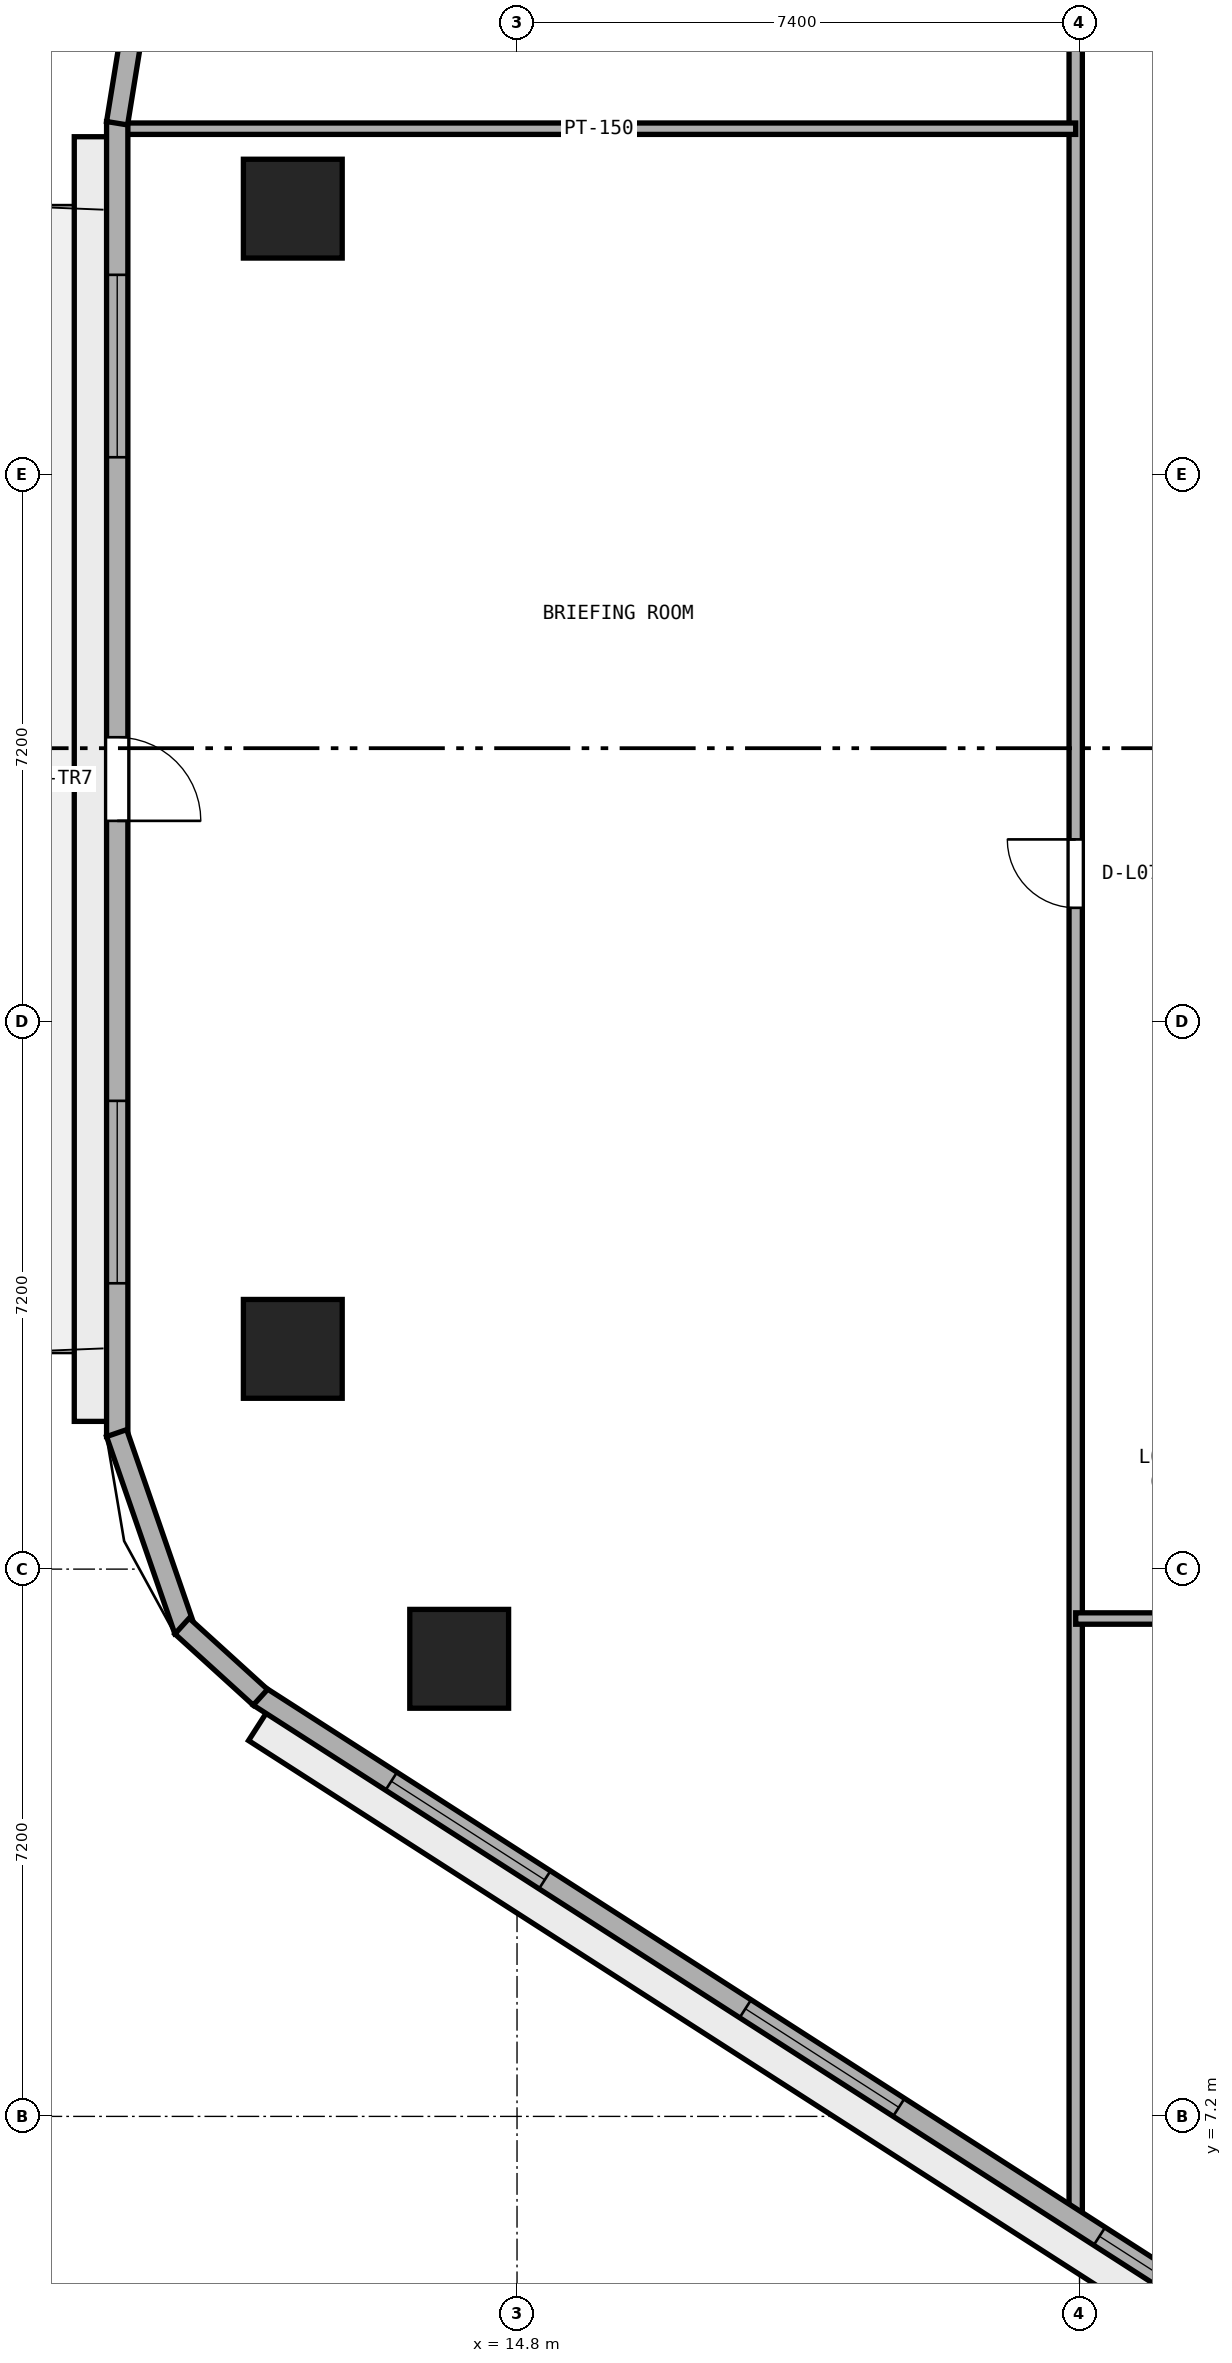
"""IFC4 building model, lengths in metres.
Left out: names, types, materials, properties, quantities, classifications, styles, units other than length and angle.
Written with IfcOpenShell. Run it as: python <this file> out.ifc"""

import sys

from ifc_helpers import new_model, si_unit, direction, frame, frame_2d, origin, origin_2d, place, context, subcontext, project, spatial, rectangle, extrude, element, fill, save


model = new_model("IFC4")
c1 = context("Model", 3, precision=1e-05, world=origin(), true_north=direction((0.0, 1.0)))
c2 = subcontext(c1, "Body", "Model", "MODEL_VIEW")
j1 = project(units=[si_unit("LENGTHUNIT", "METRE"), si_unit("PLANEANGLEUNIT", "RADIAN")], contexts=[c1])
p1 = place(None, origin())
s1 = spatial("IfcSite", under=j1, at=p1, CompositionType="ELEMENT")
p2 = place(p1, origin())
s2 = spatial("IfcBuilding", under=s1, at=p2, CompositionType="ELEMENT")
p3 = place(p2, frame((0.0, 0.0, 32.6)))
s3 = spatial("IfcBuildingStorey", under=s2, at=p3, CompositionType="ELEMENT", Elevation=32.6)
for number, where, z_axis, x_axis in (
    (1, (11.85, 32.298, 0.0), (0.0, 0.0, 1.0), (1.0, 0.0, 0.0)),
    (2, (11.85, 17.298, 0.0), (0.0, 0.0, 1.0), (1.0, 0.0, 0.0)),
    (3, (14.039, 13.22, 0.0), (0.0, 0.0, 1.0), (1.0, 0.0, 0.0)),
):
    element("IfcColumn", number, at=place(p3, frame(where, z_axis=z_axis, x_axis=x_axis)), inside=s3, PredefinedType="COLUMN", context=c2, shape_type="SweptSolid", body=[
        extrude(rectangle(XDim=1.3, YDim=1.3, at=origin_2d()), origin(), (0.0, 0.0, 1.0), 3.8),
    ])
p4 = place(p3, frame((22.15, 5.798, 0.0), z_axis=(0.0, 0.0, 1.0), x_axis=(0.0, 1.0, 0.0)))
e4 = element("IfcWall", 4, at=p4, inside=s3, PredefinedType="PARTITIONING", context=c2, shape_type="SweptSolid", body=[
    extrude(rectangle(XDim=30.852, YDim=0.175, at=frame_2d((15.426, 0.0))), origin(), (0.0, 0.0, 1.0), 3.525),
])
p5 = place(p4, frame((17.302, 0.0, 0.0)))
e5 = element("IfcOpeningElement", 5, at=p5, cuts=e4, PredefinedType="OPENING", context=c2, shape_type="SweptSolid", body=[
    extrude(rectangle(XDim=0.9, YDim=2.1, at=frame_2d((0.45, 1.05))), frame((0.0, 0.097, 0.0), z_axis=(0.0, -1.0, 0.0), x_axis=(1.0, 0.0, 0.0)), (0.0, 0.0, 1.0), 0.195),
])
p6 = place(p3, frame((22.15, 13.75, 0.0), z_axis=(0.0, 0.0, 1.0), x_axis=(1.0, 0.0, 0.0)))
e6 = element("IfcWall", 6, at=p6, inside=s3, PredefinedType="PARTITIONING", context=c2, shape_type="SweptSolid", body=[
    extrude(rectangle(XDim=29.7, YDim=0.15, at=frame_2d((14.85, 0.0))), origin(), (0.0, 0.0, 1.0), 3.525),
])
p7 = place(p6, frame((4.145, 0.0, 0.0)))
e7 = element("IfcOpeningElement", 7, at=p7, cuts=e6, PredefinedType="OPENING", context=c2, shape_type="SweptSolid", body=[
    extrude(rectangle(XDim=1.0, YDim=2.12, at=frame_2d((0.5, 1.06))), frame((0.0, 0.085, 0.0), z_axis=(0.0, -1.0, 0.0), x_axis=(1.0, 0.0, 0.0)), (0.0, 0.0, 1.0), 0.17),
])
p8 = place(p6, frame((18.755, 0.0, 0.0)))
e8 = element("IfcOpeningElement", 8, at=p8, cuts=e6, PredefinedType="OPENING", context=c2, shape_type="SweptSolid", body=[
    extrude(rectangle(XDim=1.0, YDim=2.12, at=frame_2d((0.5, 1.06))), frame((0.0, 0.085, 0.0), z_axis=(0.0, -1.0, 0.0), x_axis=(1.0, 0.0, 0.0)), (0.0, 0.0, 1.0), 0.17),
])
p9 = place(p3, frame((9.605, 33.35, 0.0), z_axis=(0.0, 0.0, 1.0), x_axis=(1.0, 0.0, 0.0)))
e9 = element("IfcWall", 9, at=p9, inside=s3, PredefinedType="PARTITIONING", context=c2, shape_type="SweptSolid", body=[
    extrude(rectangle(XDim=12.545, YDim=0.15, at=frame_2d((6.272, 0.0))), origin(), (0.0, 0.0, 1.0), 3.525),
])
p10 = place(p3, frame((9.54, 33.444, 0.0), z_axis=(0.0, 0.0, 1.0), x_axis=(0.0, -1.0, 0.0)))
e10 = element("IfcWall", 10, at=p10, inside=s3, PredefinedType="STANDARD", context=c2, shape_type="SweptSolid", body=[
    extrude(rectangle(XDim=17.301, YDim=0.28, at=frame_2d((8.65, 0.0))), origin(), (0.0, 0.0, 1.0), 3.525),
])
p11 = place(p10, frame((8.1, 0.0, 0.0)))
e11 = element("IfcOpeningElement", 11, at=p11, cuts=e10, PredefinedType="OPENING", context=c2, shape_type="SweptSolid", body=[
    extrude(rectangle(XDim=1.1, YDim=2.2, at=frame_2d((0.55, 1.1))), frame((0.0, 0.15, 0.0), z_axis=(0.0, -1.0, 0.0), x_axis=(1.0, 0.0, 0.0)), (0.0, 0.0, 1.0), 0.3),
])
p12 = place(p10, frame((2.017, 0.0, 0.9)))
e12 = element("IfcOpeningElement", 12, at=p12, cuts=e10, PredefinedType="OPENING", context=c2, shape_type="SweptSolid", body=[
    extrude(rectangle(XDim=2.4, YDim=1.75, at=frame_2d((1.2, 0.875))), frame((0.0, 0.15, 0.0), z_axis=(0.0, -1.0, 0.0), x_axis=(1.0, 0.0, 0.0)), (0.0, 0.0, 1.0), 0.3),
])
p13 = place(p10, frame((12.884, 0.0, 0.9)))
e13 = element("IfcOpeningElement", 13, at=p13, cuts=e10, PredefinedType="OPENING", context=c2, shape_type="SweptSolid", body=[
    extrude(rectangle(XDim=2.4, YDim=1.75, at=frame_2d((1.2, 0.875))), frame((0.0, 0.15, 0.0), z_axis=(0.0, -1.0, 0.0), x_axis=(1.0, 0.0, 0.0)), (0.0, 0.0, 1.0), 0.3),
])
p14 = place(p3, frame((11.405, 12.728, 0.0), z_axis=(0.0, 0.0, 1.0), x_axis=(0.841304564637, -0.540561402175, 0.0)))
e14 = element("IfcWall", 14, at=p14, inside=s3, PredefinedType="STANDARD", context=c2, shape_type="SweptSolid", body=[
    extrude(rectangle(XDim=17.612, YDim=0.28, at=frame_2d((8.806, 0.0))), origin(), (0.0, 0.0, 1.0), 3.525),
])
p15 = place(p14, frame((2.069, 0.0, 0.9)))
e15 = element("IfcOpeningElement", 15, at=p15, cuts=e14, PredefinedType="OPENING", context=c2, shape_type="SweptSolid", body=[
    extrude(rectangle(XDim=2.4, YDim=1.75, at=frame_2d((1.2, 0.875))), frame((0.0, 0.15, 0.0), z_axis=(0.0, -1.0, 0.0), x_axis=(1.0, 0.0, 0.0)), (0.0, 0.0, 1.0), 0.3),
])
p16 = place(p14, frame((7.606, 0.0, 0.9)))
e16 = element("IfcOpeningElement", 16, at=p16, cuts=e14, PredefinedType="OPENING", context=c2, shape_type="SweptSolid", body=[
    extrude(rectangle(XDim=2.4, YDim=1.75, at=frame_2d((1.2, 0.875))), frame((0.0, 0.15, 0.0), z_axis=(0.0, -1.0, 0.0), x_axis=(1.0, 0.0, 0.0)), (0.0, 0.0, 1.0), 0.3),
])
p17 = place(p14, frame((13.143, 0.0, 0.9)))
e17 = element("IfcOpeningElement", 17, at=p17, cuts=e14, PredefinedType="OPENING", context=c2, shape_type="SweptSolid", body=[
    extrude(rectangle(XDim=2.4, YDim=1.75, at=frame_2d((1.2, 0.875))), frame((0.0, 0.15, 0.0), z_axis=(0.0, -1.0, 0.0), x_axis=(1.0, 0.0, 0.0)), (0.0, 0.0, 1.0), 0.3),
])
p18 = place(p3, frame((9.753, 34.749, 0.0), z_axis=(0.0, 0.0, 1.0), x_axis=(-0.160037671962, -0.987110907423, 0.0)))
e18 = element("IfcWall", 18, at=p18, inside=s3, PredefinedType="STANDARD", context=c2, shape_type="SweptSolid", body=[
    extrude(rectangle(XDim=1.344, YDim=0.28, at=frame_2d((0.672, 0.0))), origin(), (0.0, 0.0, 1.0), 3.525),
])
p19 = place(p3, frame((9.532, 16.189, 0.0), z_axis=(0.0, 0.0, 1.0), x_axis=(0.32708309668, -0.944995580871, 0.0)))
e19 = element("IfcWall", 19, at=p19, inside=s3, PredefinedType="STANDARD", context=c2, shape_type="SweptSolid", body=[
    extrude(rectangle(XDim=2.748, YDim=0.28, at=frame_2d((1.374, 0.0))), origin(), (0.0, 0.0, 1.0), 3.525),
])
p20 = place(p3, frame((10.393, 13.651, 0.0), z_axis=(0.0, 0.0, 1.0), x_axis=(0.74003521851, -0.672568119498, 0.0)))
e20 = element("IfcWall", 20, at=p20, inside=s3, PredefinedType="STANDARD", context=c2, shape_type="SweptSolid", body=[
    extrude(rectangle(XDim=1.393, YDim=0.28, at=frame_2d((0.697, 0.0))), origin(), (0.0, 0.0, 1.0), 3.525),
])
p21 = place(p5, origin())
e21 = element("IfcDoor", 21, at=p21, inside=s3, OperationType="SINGLE_SWING_RIGHT", PredefinedType="DOOR", context=c2, shape_type="SweptSolid", body=[
    extrude(rectangle(XDim=0.9, YDim=2.1, at=frame_2d((0.45, 1.05))), frame((0.0, 0.025, 0.0), z_axis=(0.0, -1.0, 0.0), x_axis=(1.0, 0.0, 0.0)), (0.0, 0.0, 1.0), 0.05),
])
fill(e5, e21)
p22 = place(p11, origin())
e22 = element("IfcDoor", 22, at=p22, inside=s3, OperationType="SINGLE_SWING_RIGHT", PredefinedType="DOOR", context=c2, shape_type="SweptSolid", body=[
    extrude(rectangle(XDim=1.1, YDim=2.2, at=frame_2d((0.55, 1.1))), frame((0.0, 0.025, 0.0), z_axis=(0.0, -1.0, 0.0), x_axis=(1.0, 0.0, 0.0)), (0.0, 0.0, 1.0), 0.05),
])
fill(e11, e22)
p23 = place(p12, origin())
e23 = element("IfcWindow", 23, at=p23, inside=s3, PartitioningType="SINGLE_PANEL", PredefinedType="WINDOW", context=c2, shape_type="SweptSolid", body=[
    extrude(rectangle(XDim=2.4, YDim=1.75, at=frame_2d((1.2, 0.875))), frame((0.0, 0.03, 0.0), z_axis=(0.0, -1.0, 0.0), x_axis=(1.0, 0.0, 0.0)), (0.0, 0.0, 1.0), 0.06),
])
fill(e12, e23)
p24 = place(p13, origin())
e24 = element("IfcWindow", 24, at=p24, inside=s3, PartitioningType="SINGLE_PANEL", PredefinedType="WINDOW", context=c2, shape_type="SweptSolid", body=[
    extrude(rectangle(XDim=2.4, YDim=1.75, at=frame_2d((1.2, 0.875))), frame((0.0, 0.03, 0.0), z_axis=(0.0, -1.0, 0.0), x_axis=(1.0, 0.0, 0.0)), (0.0, 0.0, 1.0), 0.06),
])
fill(e13, e24)
p25 = place(p15, origin())
e25 = element("IfcWindow", 25, at=p25, inside=s3, PartitioningType="SINGLE_PANEL", PredefinedType="WINDOW", context=c2, shape_type="SweptSolid", body=[
    extrude(rectangle(XDim=2.4, YDim=1.75, at=frame_2d((1.2, 0.875))), frame((0.0, 0.03, 0.0), z_axis=(0.0, -1.0, 0.0), x_axis=(1.0, 0.0, 0.0)), (0.0, 0.0, 1.0), 0.06),
])
fill(e15, e25)
p26 = place(p16, origin())
e26 = element("IfcWindow", 26, at=p26, inside=s3, PartitioningType="SINGLE_PANEL", PredefinedType="WINDOW", context=c2, shape_type="SweptSolid", body=[
    extrude(rectangle(XDim=2.4, YDim=1.75, at=frame_2d((1.2, 0.875))), frame((0.0, 0.03, 0.0), z_axis=(0.0, -1.0, 0.0), x_axis=(1.0, 0.0, 0.0)), (0.0, 0.0, 1.0), 0.06),
])
fill(e16, e26)
p27 = place(p17, origin())
e27 = element("IfcWindow", 27, at=p27, inside=s3, PartitioningType="SINGLE_PANEL", PredefinedType="WINDOW", context=c2, shape_type="SweptSolid", body=[
    extrude(rectangle(XDim=2.4, YDim=1.75, at=frame_2d((1.2, 0.875))), frame((0.0, 0.03, 0.0), z_axis=(0.0, -1.0, 0.0), x_axis=(1.0, 0.0, 0.0)), (0.0, 0.0, 1.0), 0.06),
])
fill(e17, e27)
save(model, sys.argv[1])
